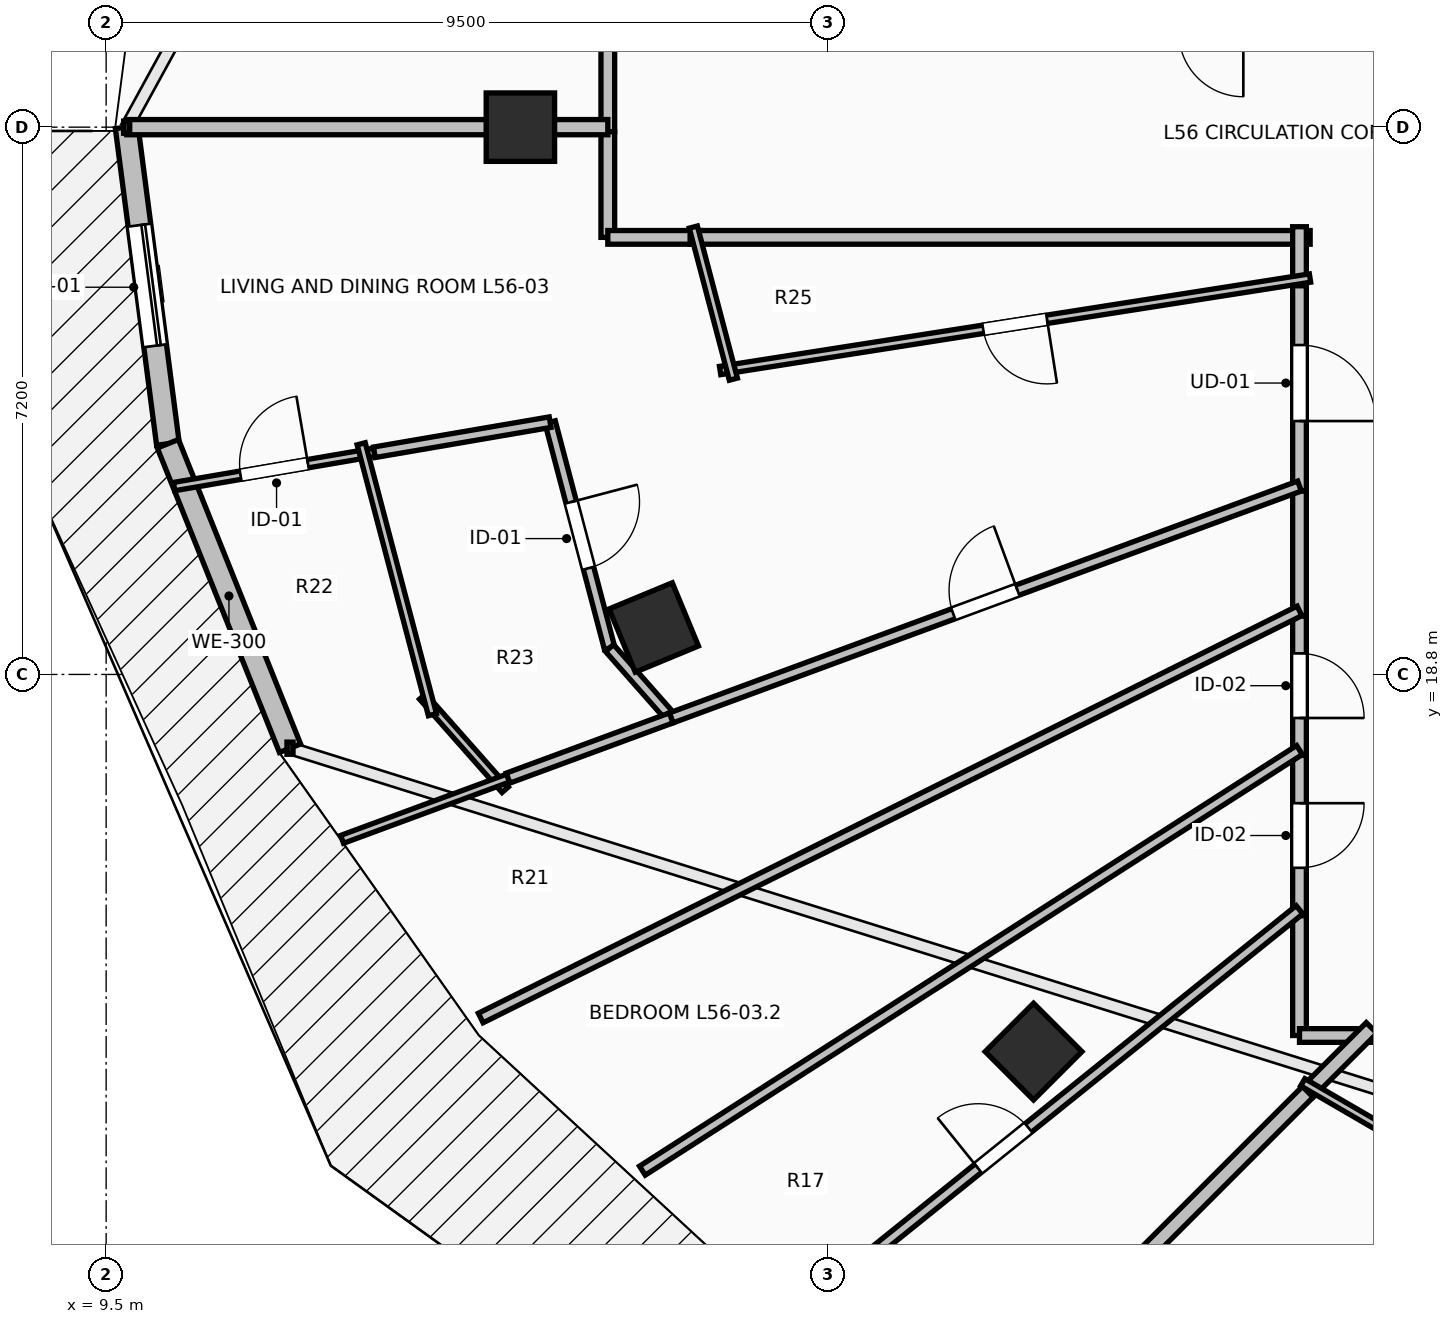
"""IFC4 building model, lengths in metres.
Left out: names, types, materials, properties, quantities, classifications, styles, units other than length and angle.
Written with IfcOpenShell. Run it as: python <this file> out.ifc"""

import sys

from ifc_helpers import new_model, si_unit, direction, frame, frame_2d, origin, origin_2d, place, context, subcontext, project, spatial, rectangle, extrude, element, fill, save


model = new_model("IFC4")
c1 = context("Model", 3, precision=1e-05, world=origin(), true_north=direction((0.0, 1.0)))
c2 = subcontext(c1, "Body", "Model", "MODEL_VIEW")
j1 = project(units=[si_unit("LENGTHUNIT", "METRE"), si_unit("PLANEANGLEUNIT", "RADIAN")], contexts=[c1])
p1 = place(None, origin())
s1 = spatial("IfcSite", under=j1, at=p1, CompositionType="ELEMENT")
p2 = place(p1, origin())
s2 = spatial("IfcBuilding", under=s1, at=p2, CompositionType="ELEMENT")
p3 = place(p2, frame((0.0, 0.0, 207.2)))
s3 = spatial("IfcBuildingStorey", under=s2, at=p3, CompositionType="ELEMENT", Elevation=207.2)
for number, where, z_axis, x_axis in (
    (1, (14.95, 26.0, 0.0), (0.0, 0.0, 1.0), (-1.0, 0.0, 0.0)),
    (2, (16.705, 19.418, 0.0), (0.0, 0.0, 1.0), (-0.924, -0.383, 0.0)),
    (3, (21.701, 13.838, 0.0), (0.0, 0.0, 1.0), (-0.707, -0.707, 0.0)),
):
    element("IfcColumn", number, at=place(p3, frame(where, z_axis=z_axis, x_axis=x_axis)), inside=s3, PredefinedType="COLUMN", context=c2, shape_type="SweptSolid", body=[
        extrude(rectangle(XDim=0.9, YDim=0.9, at=origin_2d()), origin(), (0.0, 0.0, 1.0), 3.55),
    ])
p4 = place(p3, frame((9.77, 26.0, 0.0), z_axis=(0.0, 0.0, 1.0), x_axis=(0.129147853268, -0.991625348605, 0.0)))
e4 = element("IfcWall", 4, at=p4, inside=s3, PredefinedType="STANDARD", context=c2, shape_type="SweptSolid", body=[
    extrude(rectangle(XDim=4.2, YDim=0.3, at=frame_2d((2.1, 0.0))), origin(), (0.0, 0.0, 1.0), 3.29),
])
p5 = place(p4, frame((1.3, 0.0, 0.0)))
e5 = element("IfcOpeningElement", 5, at=p5, cuts=e4, PredefinedType="OPENING", context=c2, shape_type="SweptSolid", body=[
    extrude(rectangle(XDim=1.6, YDim=2.3, at=frame_2d((0.8, 1.15))), frame((0.0, 0.165, 0.0), z_axis=(0.0, -1.0, 0.0), x_axis=(1.0, 0.0, 0.0)), (0.0, 0.0, 1.0), 0.33),
])
p6 = place(p3, frame((10.312, 21.835, 0.0), z_axis=(0.0, 0.0, 1.0), x_axis=(0.372268409848, -0.928125116043, 0.0)))
e6 = element("IfcWall", 6, at=p6, inside=s3, PredefinedType="STANDARD", context=c2, shape_type="SweptSolid", body=[
    extrude(rectangle(XDim=4.315, YDim=0.3, at=frame_2d((2.158, 0.0))), origin(), (0.0, 0.0, 1.0), 3.29),
])
p7 = place(p3, frame((16.1, 27.25, 0.0), z_axis=(0.0, 0.0, 1.0), x_axis=(0.0, -1.0, 0.0)))
e7 = element("IfcWall", 7, at=p7, inside=s3, PredefinedType="PARTITIONING", context=c2, shape_type="SweptSolid", body=[
    extrude(rectangle(XDim=1.31, YDim=0.18, at=frame_2d((0.655, 0.0))), origin(), (0.0, 0.0, 1.0), 2.482),
])
p8 = place(p3, frame((16.1, 25.94, 0.0), z_axis=(0.0, 0.0, 1.0), x_axis=(0.0, -1.0, 0.0)))
e8 = element("IfcWall", 8, at=p8, inside=s3, PredefinedType="PARTITIONING", context=c2, shape_type="SweptSolid", body=[
    extrude(rectangle(XDim=1.39, YDim=0.18, at=frame_2d((0.695, 0.0))), origin(), (0.0, 0.0, 1.0), 2.482),
])
p9 = place(p3, frame((16.1, 24.55, 0.0), z_axis=(0.0, 0.0, 1.0), x_axis=(1.0, 0.0, 0.0)))
e9 = element("IfcWall", 9, at=p9, inside=s3, PredefinedType="PARTITIONING", context=c2, shape_type="SweptSolid", body=[
    extrude(rectangle(XDim=1.223, YDim=0.18, at=frame_2d((0.611, 0.0))), origin(), (0.0, 0.0, 1.0), 3.29),
])
p10 = place(p3, frame((25.2, 24.053, 0.0), z_axis=(0.0, 0.0, 1.0), x_axis=(0.0, -1.0, 0.0)))
e10 = element("IfcWall", 10, at=p10, inside=s3, PredefinedType="PARTITIONING", context=c2, shape_type="SweptSolid", body=[
    extrude(rectangle(XDim=2.839, YDim=0.18, at=frame_2d((1.419, 0.0))), origin(), (0.0, 0.0, 1.0), 3.29),
])
p11 = place(p10, frame((0.919, 0.0, 0.0)))
e11 = element("IfcOpeningElement", 11, at=p11, cuts=e10, PredefinedType="OPENING", context=c2, shape_type="SweptSolid", body=[
    extrude(rectangle(XDim=1.0, YDim=2.15, at=frame_2d((0.5, 1.075))), frame((0.0, 0.105, 0.0), z_axis=(0.0, -1.0, 0.0), x_axis=(1.0, 0.0, 0.0)), (0.0, 0.0, 1.0), 0.21),
])
p12 = place(p3, frame((17.183, 24.55, 0.0), z_axis=(0.0, 0.0, 1.0), x_axis=(1.0, 0.0, 0.0)))
e12 = element("IfcWall", 12, at=p12, inside=s3, PredefinedType="PARTITIONING", context=c2, shape_type="SweptSolid", body=[
    extrude(rectangle(XDim=8.157, YDim=0.18, at=frame_2d((4.079, 0.0))), origin(), (0.0, 0.0, 1.0), 2.936),
])
p13 = place(p3, frame((25.2, 24.69, 0.0), z_axis=(0.0, 0.0, 1.0), x_axis=(0.0, -1.0, 0.0)))
e13 = element("IfcWall", 13, at=p13, inside=s3, PredefinedType="PARTITIONING", context=c2, shape_type="SweptSolid", body=[
    extrude(rectangle(XDim=0.777, YDim=0.18, at=frame_2d((0.388, 0.0))), origin(), (0.0, 0.0, 1.0), 3.29),
])
p14 = place(p3, frame((25.2, 21.214, 0.0), z_axis=(0.0, 0.0, 1.0), x_axis=(0.0, -1.0, 0.0)))
e14 = element("IfcWall", 14, at=p14, inside=s3, PredefinedType="PARTITIONING", context=c2, shape_type="SweptSolid", body=[
    extrude(rectangle(XDim=1.645, YDim=0.18, at=frame_2d((0.823, 0.0))), origin(), (0.0, 0.0, 1.0), 3.29),
])
p15 = place(p3, frame((25.2, 19.569, 0.0), z_axis=(0.0, 0.0, 1.0), x_axis=(0.0, -1.0, 0.0)))
e15 = element("IfcWall", 15, at=p15, inside=s3, PredefinedType="PARTITIONING", context=c2, shape_type="SweptSolid", body=[
    extrude(rectangle(XDim=1.834, YDim=0.18, at=frame_2d((0.917, 0.0))), origin(), (0.0, 0.0, 1.0), 3.29),
])
p16 = place(p15, frame((0.492, 0.0, 0.0)))
e16 = element("IfcOpeningElement", 16, at=p16, cuts=e15, PredefinedType="OPENING", context=c2, shape_type="SweptSolid", body=[
    extrude(rectangle(XDim=0.85, YDim=2.1, at=frame_2d((0.425, 1.05))), frame((0.0, 0.105, 0.0), z_axis=(0.0, -1.0, 0.0), x_axis=(1.0, 0.0, 0.0)), (0.0, 0.0, 1.0), 0.21),
])
p17 = place(p3, frame((25.2, 17.735, 0.0), z_axis=(0.0, 0.0, 1.0), x_axis=(0.0, -1.0, 0.0)))
e17 = element("IfcWall", 17, at=p17, inside=s3, PredefinedType="PARTITIONING", context=c2, shape_type="SweptSolid", body=[
    extrude(rectangle(XDim=2.108, YDim=0.18, at=frame_2d((1.054, 0.0))), origin(), (0.0, 0.0, 1.0), 2.482),
])
p18 = place(p17, frame((0.629, 0.0, 0.0)))
e18 = element("IfcOpeningElement", 18, at=p18, cuts=e17, PredefinedType="OPENING", context=c2, shape_type="SweptSolid", body=[
    extrude(rectangle(XDim=0.85, YDim=2.1, at=frame_2d((0.425, 1.05))), frame((0.0, 0.105, 0.0), z_axis=(0.0, -1.0, 0.0), x_axis=(1.0, 0.0, 0.0)), (0.0, 0.0, 1.0), 0.21),
])
p19 = place(p3, frame((25.2, 15.627, 0.0), z_axis=(0.0, 0.0, 1.0), x_axis=(0.0, -1.0, 0.0)))
e19 = element("IfcWall", 19, at=p19, inside=s3, PredefinedType="PARTITIONING", context=c2, shape_type="SweptSolid", body=[
    extrude(rectangle(XDim=1.577, YDim=0.18, at=frame_2d((0.789, 0.0))), origin(), (0.0, 0.0, 1.0), 2.482),
])
p20 = place(p3, frame((25.2, 14.05, 0.0), z_axis=(0.0, 0.0, 1.0), x_axis=(1.0, 0.0, 0.0)))
e20 = element("IfcWall", 20, at=p20, inside=s3, PredefinedType="PARTITIONING", context=c2, shape_type="SweptSolid", body=[
    extrude(rectangle(XDim=0.91, YDim=0.18, at=frame_2d((0.455, 0.0))), origin(), (0.0, 0.0, 1.0), 3.022),
])
p21 = place(p3, frame((25.97, 14.05, 0.0), z_axis=(0.0, 0.0, 1.0), x_axis=(1.0, 0.0, 0.0)))
e21 = element("IfcWall", 21, at=p21, inside=s3, PredefinedType="PARTITIONING", context=c2, shape_type="SweptSolid", body=[
    extrude(rectangle(XDim=3.385, YDim=0.18, at=frame_2d((1.692, 0.0))), origin(), (0.0, 0.0, 1.0), 2.482),
])
p22 = place(p3, frame((9.771, 26.0, 0.0), z_axis=(0.0, 0.0, 1.0), x_axis=(1.0, 0.0, 0.0)))
e22 = element("IfcWall", 22, at=p22, inside=s3, PredefinedType="PARTITIONING", context=c2, shape_type="SweptSolid", body=[
    extrude(rectangle(XDim=6.329, YDim=0.2, at=frame_2d((3.165, 0.0))), origin(), (0.0, 0.0, 1.0), 2.482),
])
p23 = place(p3, frame((25.338, 24.015, 0.0), z_axis=(0.0, 0.0, 1.0), x_axis=(-0.987940229144, -0.154835731144, 0.0)))
e23 = element("IfcWall", 23, at=p23, inside=s3, PredefinedType="PARTITIONING", context=c2, shape_type="SweptSolid", body=[
    extrude(rectangle(XDim=7.855, YDim=0.11, at=frame_2d((3.928, 0.0))), origin(), (0.0, 0.0, 1.0), 2.936),
])
p24 = place(p23, frame((3.503, 0.0, 0.0)))
e24 = element("IfcOpeningElement", 24, at=p24, cuts=e23, PredefinedType="OPENING", context=c2, shape_type="SweptSolid", body=[
    extrude(rectangle(XDim=0.85, YDim=2.1, at=frame_2d((0.425, 1.05))), frame((0.0, 0.07, 0.0), z_axis=(0.0, -1.0, 0.0), x_axis=(1.0, 0.0, 0.0)), (0.0, 0.0, 1.0), 0.14),
])
p25 = place(p3, frame((17.752, 22.685, 0.0), z_axis=(0.0, 0.0, 1.0), x_axis=(-0.254429402158, 0.967091350038, 0.0)))
e25 = element("IfcWall", 25, at=p25, inside=s3, PredefinedType="PARTITIONING", context=c2, shape_type="SweptSolid", body=[
    extrude(rectangle(XDim=2.069, YDim=0.11, at=frame_2d((1.034, 0.0))), origin(), (0.0, 0.0, 1.0), 3.29),
])
p26 = place(p3, frame((10.394, 21.271, 0.0), z_axis=(0.0, 0.0, 1.0), x_axis=(0.985656128296, 0.168766100722, 0.0)))
e26 = element("IfcWall", 26, at=p26, inside=s3, PredefinedType="PARTITIONING", context=c2, shape_type="SweptSolid", body=[
    extrude(rectangle(XDim=2.673, YDim=0.11, at=frame_2d((1.337, 0.0))), origin(), (0.0, 0.0, 1.0), 3.29),
])
p27 = place(p26, frame((0.887, 0.0, 0.0)))
e27 = element("IfcOpeningElement", 27, at=p27, cuts=e26, PredefinedType="OPENING", context=c2, shape_type="SweptSolid", body=[
    extrude(rectangle(XDim=0.9, YDim=2.1, at=frame_2d((0.45, 1.05))), frame((0.0, 0.07, 0.0), z_axis=(0.0, -1.0, 0.0), x_axis=(1.0, 0.0, 0.0)), (0.0, 0.0, 1.0), 0.14),
])
p28 = place(p3, frame((15.341, 22.119, 0.0), z_axis=(0.0, 0.0, 1.0), x_axis=(0.254462015144, -0.967082769389, 0.0)))
e28 = element("IfcWall", 28, at=p28, inside=s3, PredefinedType="PARTITIONING", context=c2, shape_type="SweptSolid", body=[
    extrude(rectangle(XDim=3.073, YDim=0.14, at=frame_2d((1.537, 0.0))), origin(), (0.0, 0.0, 1.0), 3.29),
])
p29 = place(p28, frame((1.087, 0.0, 0.0)))
e29 = element("IfcOpeningElement", 29, at=p29, cuts=e28, PredefinedType="OPENING", context=c2, shape_type="SweptSolid", body=[
    extrude(rectangle(XDim=0.9, YDim=2.1, at=frame_2d((0.45, 1.05))), frame((0.0, 0.085, 0.0), z_axis=(0.0, -1.0, 0.0), x_axis=(1.0, 0.0, 0.0)), (0.0, 0.0, 1.0), 0.17),
])
p30 = place(p3, frame((16.123, 19.147, 0.0), z_axis=(0.0, 0.0, 1.0), x_axis=(0.66171386468, -0.749756467988, 0.0)))
e30 = element("IfcWall", 30, at=p30, inside=s3, PredefinedType="PARTITIONING", context=c2, shape_type="SweptSolid", body=[
    extrude(rectangle(XDim=1.226, YDim=0.14, at=frame_2d((0.613, 0.0))), origin(), (0.0, 0.0, 1.0), 3.29),
])
p31 = place(p3, frame((13.029, 21.723, 0.0), z_axis=(0.0, 0.0, 1.0), x_axis=(0.985629682191, 0.16892048302, 0.0)))
e31 = element("IfcWall", 31, at=p31, inside=s3, PredefinedType="PARTITIONING", context=c2, shape_type="SweptSolid", body=[
    extrude(rectangle(XDim=2.346, YDim=0.14, at=frame_2d((1.173, 0.0))), origin(), (0.0, 0.0, 1.0), 3.29),
])
p32 = place(p3, frame((16.934, 18.228, 0.0), z_axis=(0.0, 0.0, 1.0), x_axis=(0.938168899516, 0.34617786755, 0.0)))
e32 = element("IfcWall", 32, at=p32, inside=s3, PredefinedType="PARTITIONING", context=c2, shape_type="SweptSolid", body=[
    extrude(rectangle(XDim=8.811, YDim=0.14, at=frame_2d((4.405, 0.0))), origin(), (0.0, 0.0, 1.0), 2.482),
])
p33 = place(p32, frame((3.955, 0.0, 0.0)))
e33 = element("IfcOpeningElement", 33, at=p33, cuts=e32, PredefinedType="OPENING", context=c2, shape_type="SweptSolid", body=[
    extrude(rectangle(XDim=0.9, YDim=2.1, at=frame_2d((0.45, 1.05))), frame((0.0, 0.085, 0.0), z_axis=(0.0, -1.0, 0.0), x_axis=(1.0, 0.0, 0.0)), (0.0, 0.0, 1.0), 0.17),
])
p34 = place(p3, frame((14.75, 17.283, 0.0), z_axis=(0.0, 0.0, 1.0), x_axis=(-0.662345628205, 0.749198417509, 0.0)))
e34 = element("IfcWall", 34, at=p34, inside=s3, PredefinedType="PARTITIONING", context=c2, shape_type="SweptSolid", body=[
    extrude(rectangle(XDim=1.639, YDim=0.11, at=frame_2d((0.819, 0.0))), origin(), (0.0, 0.0, 1.0), 3.29),
])
p35 = place(p3, frame((13.792, 18.271, 0.0), z_axis=(0.0, 0.0, 1.0), x_axis=(-0.254271540361, 0.967132867688, 0.0)))
e35 = element("IfcWall", 35, at=p35, inside=s3, PredefinedType="PARTITIONING", context=c2, shape_type="SweptSolid", body=[
    extrude(rectangle(XDim=3.685, YDim=0.11, at=frame_2d((1.843, 0.0))), origin(), (0.0, 0.0, 1.0), 3.29),
])
p36 = place(p3, frame((12.604, 16.631, 0.0), z_axis=(0.0, 0.0, 1.0), x_axis=(0.938194450562, 0.346108614361, 0.0)))
e36 = element("IfcWall", 36, at=p36, inside=s3, PredefinedType="PARTITIONING", context=c2, shape_type="SweptSolid", body=[
    extrude(rectangle(XDim=2.328, YDim=0.11, at=frame_2d((1.164, 0.0))), origin(), (0.0, 0.0, 1.0), 3.29),
])
p37 = place(p3, frame((14.788, 17.436, 0.0), z_axis=(0.0, 0.0, 1.0), x_axis=(0.938171690747, 0.346170303003, 0.0)))
e37 = element("IfcWall", 37, at=p37, inside=s3, PredefinedType="PARTITIONING", context=c2, shape_type="SweptSolid", body=[
    extrude(rectangle(XDim=2.287, YDim=0.14, at=frame_2d((1.144, 0.0))), origin(), (0.0, 0.0, 1.0), 3.29),
])
p38 = place(p3, frame((14.428, 14.28, 0.0), z_axis=(0.0, 0.0, 1.0), x_axis=(0.895423439435, 0.44521552546, 0.0)))
e38 = element("IfcWall", 38, at=p38, inside=s3, PredefinedType="PARTITIONING", context=c2, shape_type="SweptSolid", body=[
    extrude(rectangle(XDim=12.03, YDim=0.14, at=frame_2d((6.015, 0.0))), origin(), (0.0, 0.0, 1.0), 2.482),
])
p39 = place(p3, frame((16.555, 12.272, 0.0), z_axis=(0.0, 0.0, 1.0), x_axis=(0.842221721565, 0.539131312135, 0.0)))
e39 = element("IfcWall", 39, at=p39, inside=s3, PredefinedType="PARTITIONING", context=c2, shape_type="SweptSolid", body=[
    extrude(rectangle(XDim=10.265, YDim=0.14, at=frame_2d((5.132, 0.0))), origin(), (0.0, 0.0, 1.0), 2.482),
])
p40 = place(p3, frame((18.715, 10.487, 0.0), z_axis=(0.0, 0.0, 1.0), x_axis=(0.779157389419, 0.626828335762, 0.0)))
e40 = element("IfcWall", 40, at=p40, inside=s3, PredefinedType="PARTITIONING", context=c2, shape_type="SweptSolid", body=[
    extrude(rectangle(XDim=8.323, YDim=0.14, at=frame_2d((4.162, 0.0))), origin(), (0.0, 0.0, 1.0), 2.482),
])
p41 = place(p40, frame((2.896, 0.0, 0.0)))
e41 = element("IfcOpeningElement", 41, at=p41, cuts=e40, PredefinedType="OPENING", context=c2, shape_type="SweptSolid", body=[
    extrude(rectangle(XDim=0.85, YDim=2.1, at=frame_2d((0.425, 1.05))), frame((0.0, 0.085, 0.0), z_axis=(0.0, -1.0, 0.0), x_axis=(1.0, 0.0, 0.0)), (0.0, 0.0, 1.0), 0.17),
])
p42 = place(p3, frame((21.041, 9.041, 0.0), z_axis=(0.0, 0.0, 1.0), x_axis=(0.707106781187, 0.707106781187, 0.0)))
e42 = element("IfcWall", 42, at=p42, inside=s3, PredefinedType="PARTITIONING", context=c2, shape_type="SweptSolid", body=[
    extrude(rectangle(XDim=6.176, YDim=0.2, at=frame_2d((3.088, 0.0))), origin(), (0.0, 0.0, 1.0), 2.824),
])
p43 = place(p3, frame((25.309, 13.309, 0.0), z_axis=(0.0, 0.0, 1.0), x_axis=(0.707106781187, 0.707106781187, 0.0)))
e43 = element("IfcWall", 43, at=p43, inside=s3, PredefinedType="PARTITIONING", context=c2, shape_type="SweptSolid", body=[
    extrude(rectangle(XDim=1.188, YDim=0.2, at=frame_2d((0.594, 0.0))), origin(), (0.0, 0.0, 1.0), 3.022),
])
p44 = place(p3, frame((27.568, 12.083, 0.0), z_axis=(0.0, 0.0, 1.0), x_axis=(-0.864515441931, 0.502606258082, 0.0)))
e44 = element("IfcWall", 44, at=p44, inside=s3, PredefinedType="PARTITIONING", context=c2, shape_type="SweptSolid", body=[
    extrude(rectangle(XDim=2.69, YDim=0.11, at=frame_2d((1.345, 0.0))), origin(), (0.0, 0.0, 1.0), 3.29),
])
p45 = place(p3, frame((25.881, 8.871, 0.0), z_axis=(0.0, 0.0, 1.0), x_axis=(0.577734997211, 0.816224401128, 0.0)))
e45 = element("IfcWall", 45, at=p45, inside=s3, PredefinedType="PARTITIONING", context=c2, shape_type="SweptSolid", body=[
    extrude(rectangle(XDim=2.951, YDim=0.14, at=frame_2d((1.476, 0.0))), origin(), (0.0, 0.0, 1.0), 2.824),
])
p46 = place(p45, frame((1.026, 0.0, 0.0)))
e46 = element("IfcOpeningElement", 46, at=p46, cuts=e45, PredefinedType="OPENING", context=c2, shape_type="SweptSolid", body=[
    extrude(rectangle(XDim=0.9, YDim=2.1, at=frame_2d((0.45, 1.05))), frame((0.0, 0.085, 0.0), z_axis=(0.0, -1.0, 0.0), x_axis=(1.0, 0.0, 0.0)), (0.0, 0.0, 1.0), 0.17),
])
p47 = place(p5, origin())
e47 = element("IfcDoor", 47, at=p47, inside=s3, OperationType="SLIDING_TO_LEFT", PredefinedType="DOOR", context=c2, shape_type="SweptSolid", body=[
    extrude(rectangle(XDim=1.6, YDim=2.3, at=frame_2d((0.8, 1.15))), frame((0.0, 0.025, 0.0), z_axis=(0.0, -1.0, 0.0), x_axis=(1.0, 0.0, 0.0)), (0.0, 0.0, 1.0), 0.05),
])
fill(e5, e47)
p48 = place(p11, origin())
e48 = element("IfcDoor", 48, at=p48, inside=s3, OperationType="SINGLE_SWING_RIGHT", PredefinedType="DOOR", context=c2, shape_type="SweptSolid", body=[
    extrude(rectangle(XDim=1.0, YDim=2.15, at=frame_2d((0.5, 1.075))), frame((0.0, 0.025, 0.0), z_axis=(0.0, -1.0, 0.0), x_axis=(1.0, 0.0, 0.0)), (0.0, 0.0, 1.0), 0.05),
])
fill(e11, e48)
p49 = place(p24, origin())
e49 = element("IfcDoor", 49, at=p49, inside=s3, OperationType="SINGLE_SWING_LEFT", PredefinedType="DOOR", context=c2, shape_type="SweptSolid", body=[
    extrude(rectangle(XDim=0.85, YDim=2.1, at=frame_2d((0.425, 1.05))), frame((0.0, 0.025, 0.0), z_axis=(0.0, -1.0, 0.0), x_axis=(1.0, 0.0, 0.0)), (0.0, 0.0, 1.0), 0.05),
])
fill(e24, e49)
p50 = place(p27, origin())
e50 = element("IfcDoor", 50, at=p50, inside=s3, OperationType="SINGLE_SWING_RIGHT", PredefinedType="DOOR", context=c2, shape_type="SweptSolid", body=[
    extrude(rectangle(XDim=0.9, YDim=2.1, at=frame_2d((0.45, 1.05))), frame((0.0, 0.025, 0.0), z_axis=(0.0, -1.0, 0.0), x_axis=(1.0, 0.0, 0.0)), (0.0, 0.0, 1.0), 0.05),
])
fill(e27, e50)
p51 = place(p29, origin())
e51 = element("IfcDoor", 51, at=p51, inside=s3, OperationType="SINGLE_SWING_LEFT", PredefinedType="DOOR", context=c2, shape_type="SweptSolid", body=[
    extrude(rectangle(XDim=0.9, YDim=2.1, at=frame_2d((0.45, 1.05))), frame((0.0, 0.025, 0.0), z_axis=(0.0, -1.0, 0.0), x_axis=(1.0, 0.0, 0.0)), (0.0, 0.0, 1.0), 0.05),
])
fill(e29, e51)
p52 = place(p33, origin())
e52 = element("IfcDoor", 52, at=p52, inside=s3, OperationType="SINGLE_SWING_RIGHT", PredefinedType="DOOR", context=c2, shape_type="SweptSolid", body=[
    extrude(rectangle(XDim=0.9, YDim=2.1, at=frame_2d((0.45, 1.05))), frame((0.0, 0.025, 0.0), z_axis=(0.0, -1.0, 0.0), x_axis=(1.0, 0.0, 0.0)), (0.0, 0.0, 1.0), 0.05),
])
fill(e33, e52)
p53 = place(p16, origin())
e53 = element("IfcDoor", 53, at=p53, inside=s3, OperationType="SINGLE_SWING_RIGHT", PredefinedType="DOOR", context=c2, shape_type="SweptSolid", body=[
    extrude(rectangle(XDim=0.85, YDim=2.1, at=frame_2d((0.425, 1.05))), frame((0.0, 0.025, 0.0), z_axis=(0.0, -1.0, 0.0), x_axis=(1.0, 0.0, 0.0)), (0.0, 0.0, 1.0), 0.05),
])
fill(e16, e53)
p54 = place(p18, origin())
e54 = element("IfcDoor", 54, at=p54, inside=s3, OperationType="SINGLE_SWING_LEFT", PredefinedType="DOOR", context=c2, shape_type="SweptSolid", body=[
    extrude(rectangle(XDim=0.85, YDim=2.1, at=frame_2d((0.425, 1.05))), frame((0.0, 0.025, 0.0), z_axis=(0.0, -1.0, 0.0), x_axis=(1.0, 0.0, 0.0)), (0.0, 0.0, 1.0), 0.05),
])
fill(e18, e54)
p55 = place(p41, origin())
e55 = element("IfcDoor", 55, at=p55, inside=s3, OperationType="SINGLE_SWING_LEFT", PredefinedType="DOOR", context=c2, shape_type="SweptSolid", body=[
    extrude(rectangle(XDim=0.85, YDim=2.1, at=frame_2d((0.425, 1.05))), frame((0.0, 0.025, 0.0), z_axis=(0.0, -1.0, 0.0), x_axis=(1.0, 0.0, 0.0)), (0.0, 0.0, 1.0), 0.05),
])
fill(e41, e55)
save(model, sys.argv[1])
